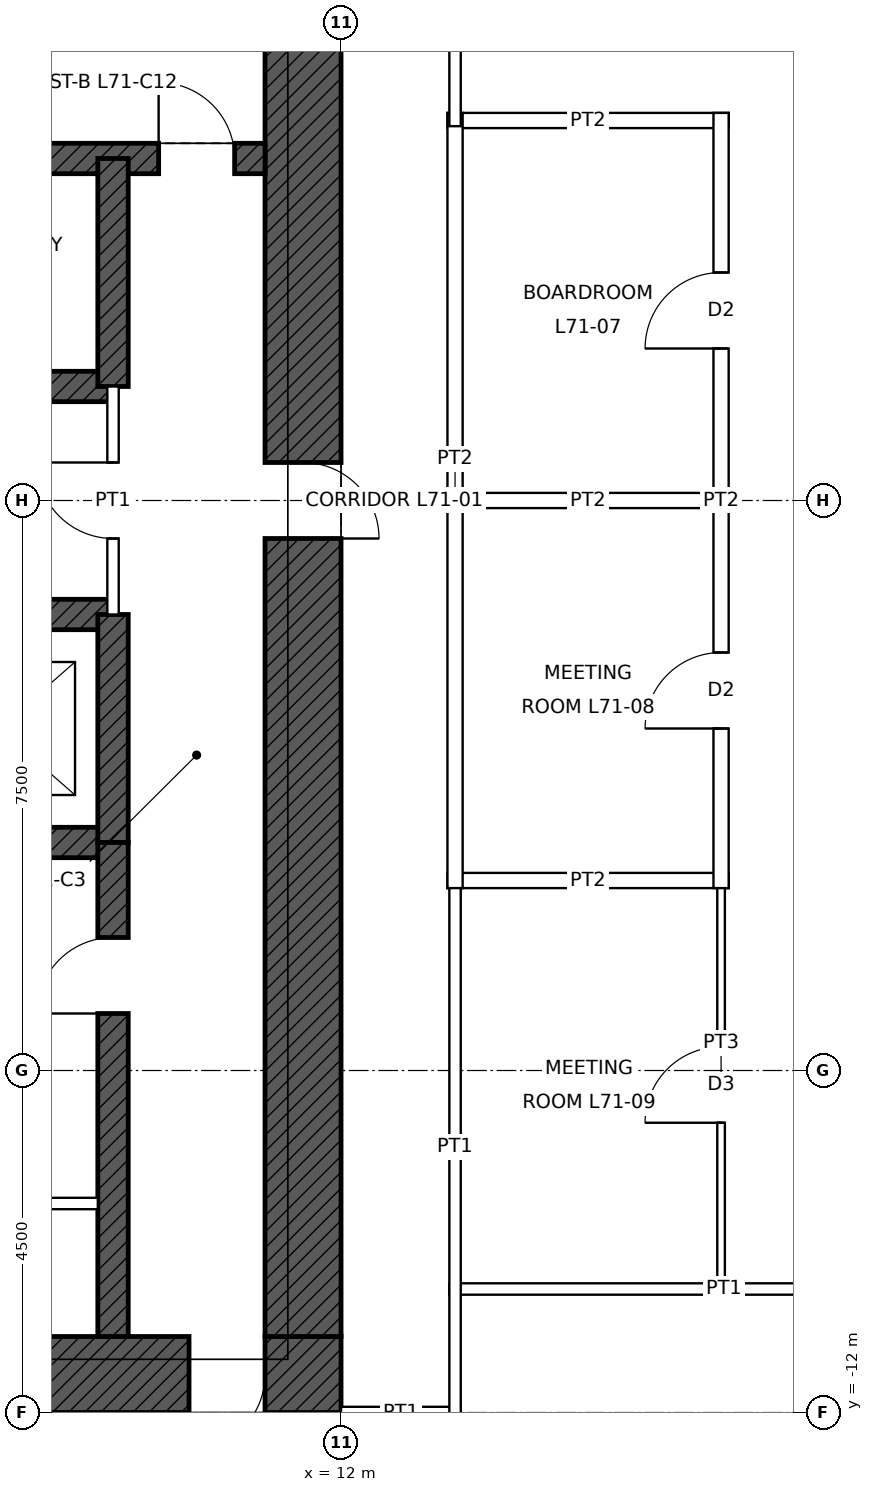
"""IFC4 building model, lengths in metres.
Left out: names, types, materials, properties, quantities, classifications, styles, units other than length and angle.
Written with IfcOpenShell. Run it as: python <this file> out.ifc"""

import sys

from ifc_helpers import new_model, si_unit, direction, frame, frame_2d, origin, place, context, subcontext, project, spatial, rectangle, extrude, element, fill, save


model = new_model("IFC4")
c1 = context("Model", 3, precision=1e-05, world=origin(), true_north=direction((0.0, 1.0)))
c2 = subcontext(c1, "Body", "Model", "MODEL_VIEW")
j1 = project(units=[si_unit("LENGTHUNIT", "METRE"), si_unit("PLANEANGLEUNIT", "RADIAN")], contexts=[c1])
p1 = place(None, origin())
s1 = spatial("IfcSite", under=j1, at=p1, CompositionType="ELEMENT")
p2 = place(p1, origin())
s2 = spatial("IfcBuilding", under=s1, at=p2, CompositionType="ELEMENT")
p3 = place(p2, frame((0.0, 0.0, 319.9)))
s3 = spatial("IfcBuildingStorey", under=s2, at=p3, CompositionType="ELEMENT", Elevation=319.9)
p4 = place(p3, frame((12.0, -11.5, 0.0), z_axis=(0.0, 0.0, 1.0), x_axis=(-1.0, 0.0, 0.0)))
e1 = element("IfcWall", 1, at=p4, inside=s3, PredefinedType="SHEAR", context=c2, shape_type="SweptSolid", body=[
    extrude(rectangle(XDim=24.0, YDim=1.0, at=frame_2d((12.0, 0.0))), origin(), (0.0, 0.0, 1.0), 4.0),
])
p5 = place(p4, frame((11.5, 0.0, 0.0)))
e2 = element("IfcOpeningElement", 2, at=p5, cuts=e1, PredefinedType="OPENING", context=c2, shape_type="SweptSolid", body=[
    extrude(rectangle(XDim=1.0, YDim=2.1, at=frame_2d((0.5, 1.05))), frame((0.0, 0.51, 0.0), z_axis=(0.0, -1.0, 0.0), x_axis=(1.0, 0.0, 0.0)), (0.0, 0.0, 1.0), 1.02),
])
p6 = place(p4, frame((1.0, 0.0, 0.0)))
e3 = element("IfcOpeningElement", 3, at=p6, cuts=e1, PredefinedType="OPENING", context=c2, shape_type="SweptSolid", body=[
    extrude(rectangle(XDim=1.0, YDim=2.4, at=frame_2d((0.5, 1.2))), frame((0.0, 0.51, 0.0), z_axis=(0.0, -1.0, 0.0), x_axis=(1.0, 0.0, 0.0)), (0.0, 0.0, 1.0), 1.02),
])
p7 = place(p3, frame((11.5, 11.0, 0.0), z_axis=(0.0, 0.0, 1.0), x_axis=(0.0, -1.0, 0.0)))
e4 = element("IfcWall", 4, at=p7, inside=s3, PredefinedType="SHEAR", context=c2, shape_type="SweptSolid", body=[
    extrude(rectangle(XDim=22.0, YDim=1.0, at=frame_2d((11.0, 0.0))), origin(), (0.0, 0.0, 1.0), 4.0),
])
p8 = place(p7, frame((10.5, 0.0, 0.0)))
e5 = element("IfcOpeningElement", 5, at=p8, cuts=e4, PredefinedType="OPENING", context=c2, shape_type="SweptSolid", body=[
    extrude(rectangle(XDim=1.0, YDim=2.4, at=frame_2d((0.5, 1.2))), frame((0.0, 0.51, 0.0), z_axis=(0.0, -1.0, 0.0), x_axis=(1.0, 0.0, 0.0)), (0.0, 0.0, 1.0), 1.02),
])
p9 = place(p3, frame((-11.0, 4.5, 0.0), z_axis=(0.0, 0.0, 1.0), x_axis=(1.0, 0.0, 0.0)))
e6 = element("IfcWall", 6, at=p9, inside=s3, PredefinedType="SHEAR", context=c2, shape_type="SweptSolid", body=[
    extrude(rectangle(XDim=22.0, YDim=0.4, at=frame_2d((11.0, 0.0))), origin(), (0.0, 0.0, 1.0), 4.0),
])
p10 = place(p9, frame((0.4, 0.0, 0.0)))
e7 = element("IfcOpeningElement", 7, at=p10, cuts=e6, PredefinedType="OPENING", context=c2, shape_type="SweptSolid", body=[
    extrude(rectangle(XDim=1.0, YDim=2.1, at=frame_2d((0.5, 1.05))), frame((0.0, 0.21, 0.0), z_axis=(0.0, -1.0, 0.0), x_axis=(1.0, 0.0, 0.0)), (0.0, 0.0, 1.0), 0.42),
])
p11 = place(p9, frame((20.6, 0.0, 0.0)))
e8 = element("IfcOpeningElement", 8, at=p11, cuts=e6, PredefinedType="OPENING", context=c2, shape_type="SweptSolid", body=[
    extrude(rectangle(XDim=1.0, YDim=2.1, at=frame_2d((0.5, 1.05))), frame((0.0, 0.21, 0.0), z_axis=(0.0, -1.0, 0.0), x_axis=(1.0, 0.0, 0.0)), (0.0, 0.0, 1.0), 0.42),
])
p12 = place(p3, frame((-9.0, 1.5, 0.0), z_axis=(0.0, 0.0, 1.0), x_axis=(1.0, 0.0, 0.0)))
e9 = element("IfcWall", 9, at=p12, inside=s3, PredefinedType="SHEAR", context=c2, shape_type="SweptSolid", body=[
    extrude(rectangle(XDim=18.0, YDim=0.4, at=frame_2d((9.0, 0.0))), origin(), (0.0, 0.0, 1.0), 4.0),
])
p13 = place(p12, frame((0.95, 0.0, 0.0)))
e10 = element("IfcOpeningElement", 10, at=p13, cuts=e9, PredefinedType="OPENING", context=c2, shape_type="SweptSolid", body=[
    extrude(rectangle(XDim=1.1, YDim=2.1, at=frame_2d((0.55, 1.05))), frame((0.0, 0.21, 0.0), z_axis=(0.0, -1.0, 0.0), x_axis=(1.0, 0.0, 0.0)), (0.0, 0.0, 1.0), 0.42),
])
p14 = place(p12, frame((3.95, 0.0, 0.0)))
e11 = element("IfcOpeningElement", 11, at=p14, cuts=e9, PredefinedType="OPENING", context=c2, shape_type="SweptSolid", body=[
    extrude(rectangle(XDim=1.1, YDim=2.1, at=frame_2d((0.55, 1.05))), frame((0.0, 0.21, 0.0), z_axis=(0.0, -1.0, 0.0), x_axis=(1.0, 0.0, 0.0)), (0.0, 0.0, 1.0), 0.42),
])
p15 = place(p12, frame((6.95, 0.0, 0.0)))
e12 = element("IfcOpeningElement", 12, at=p15, cuts=e9, PredefinedType="OPENING", context=c2, shape_type="SweptSolid", body=[
    extrude(rectangle(XDim=1.1, YDim=2.1, at=frame_2d((0.55, 1.05))), frame((0.0, 0.21, 0.0), z_axis=(0.0, -1.0, 0.0), x_axis=(1.0, 0.0, 0.0)), (0.0, 0.0, 1.0), 0.42),
])
p16 = place(p12, frame((9.95, 0.0, 0.0)))
e13 = element("IfcOpeningElement", 13, at=p16, cuts=e9, PredefinedType="OPENING", context=c2, shape_type="SweptSolid", body=[
    extrude(rectangle(XDim=1.1, YDim=2.1, at=frame_2d((0.55, 1.05))), frame((0.0, 0.21, 0.0), z_axis=(0.0, -1.0, 0.0), x_axis=(1.0, 0.0, 0.0)), (0.0, 0.0, 1.0), 0.42),
])
p17 = place(p12, frame((12.95, 0.0, 0.0)))
e14 = element("IfcOpeningElement", 14, at=p17, cuts=e9, PredefinedType="OPENING", context=c2, shape_type="SweptSolid", body=[
    extrude(rectangle(XDim=1.1, YDim=2.1, at=frame_2d((0.55, 1.05))), frame((0.0, 0.21, 0.0), z_axis=(0.0, -1.0, 0.0), x_axis=(1.0, 0.0, 0.0)), (0.0, 0.0, 1.0), 0.42),
])
p18 = place(p12, frame((15.95, 0.0, 0.0)))
e15 = element("IfcOpeningElement", 15, at=p18, cuts=e9, PredefinedType="OPENING", context=c2, shape_type="SweptSolid", body=[
    extrude(rectangle(XDim=1.1, YDim=2.1, at=frame_2d((0.55, 1.05))), frame((0.0, 0.21, 0.0), z_axis=(0.0, -1.0, 0.0), x_axis=(1.0, 0.0, 0.0)), (0.0, 0.0, 1.0), 0.42),
])
p19 = place(p3, frame((-9.0, -1.5, 0.0), z_axis=(0.0, 0.0, 1.0), x_axis=(1.0, 0.0, 0.0)))
e16 = element("IfcWall", 16, at=p19, inside=s3, PredefinedType="SHEAR", context=c2, shape_type="SweptSolid", body=[
    extrude(rectangle(XDim=18.0, YDim=0.4, at=frame_2d((9.0, 0.0))), origin(), (0.0, 0.0, 1.0), 4.0),
])
p20 = place(p19, frame((9.95, 0.0, 0.0)))
e17 = element("IfcOpeningElement", 17, at=p20, cuts=e16, PredefinedType="OPENING", context=c2, shape_type="SweptSolid", body=[
    extrude(rectangle(XDim=1.1, YDim=2.1, at=frame_2d((0.55, 1.05))), frame((0.0, 0.21, 0.0), z_axis=(0.0, -1.0, 0.0), x_axis=(1.0, 0.0, 0.0)), (0.0, 0.0, 1.0), 0.42),
])
p21 = place(p19, frame((12.95, 0.0, 0.0)))
e18 = element("IfcOpeningElement", 18, at=p21, cuts=e16, PredefinedType="OPENING", context=c2, shape_type="SweptSolid", body=[
    extrude(rectangle(XDim=1.1, YDim=2.1, at=frame_2d((0.55, 1.05))), frame((0.0, 0.21, 0.0), z_axis=(0.0, -1.0, 0.0), x_axis=(1.0, 0.0, 0.0)), (0.0, 0.0, 1.0), 0.42),
])
p22 = place(p19, frame((15.95, 0.0, 0.0)))
e19 = element("IfcOpeningElement", 19, at=p22, cuts=e16, PredefinedType="OPENING", context=c2, shape_type="SweptSolid", body=[
    extrude(rectangle(XDim=1.1, YDim=2.1, at=frame_2d((0.55, 1.05))), frame((0.0, 0.21, 0.0), z_axis=(0.0, -1.0, 0.0), x_axis=(1.0, 0.0, 0.0)), (0.0, 0.0, 1.0), 0.42),
])
p23 = place(p19, frame((0.95, 0.0, 0.0)))
e20 = element("IfcOpeningElement", 20, at=p23, cuts=e16, PredefinedType="OPENING", context=c2, shape_type="SweptSolid", body=[
    extrude(rectangle(XDim=1.1, YDim=2.1, at=frame_2d((0.55, 1.05))), frame((0.0, 0.21, 0.0), z_axis=(0.0, -1.0, 0.0), x_axis=(1.0, 0.0, 0.0)), (0.0, 0.0, 1.0), 0.42),
])
p24 = place(p19, frame((3.95, 0.0, 0.0)))
e21 = element("IfcOpeningElement", 21, at=p24, cuts=e16, PredefinedType="OPENING", context=c2, shape_type="SweptSolid", body=[
    extrude(rectangle(XDim=1.1, YDim=2.1, at=frame_2d((0.55, 1.05))), frame((0.0, 0.21, 0.0), z_axis=(0.0, -1.0, 0.0), x_axis=(1.0, 0.0, 0.0)), (0.0, 0.0, 1.0), 0.42),
])
p25 = place(p19, frame((6.95, 0.0, 0.0)))
e22 = element("IfcOpeningElement", 22, at=p25, cuts=e16, PredefinedType="OPENING", context=c2, shape_type="SweptSolid", body=[
    extrude(rectangle(XDim=1.1, YDim=2.1, at=frame_2d((0.55, 1.05))), frame((0.0, 0.21, 0.0), z_axis=(0.0, -1.0, 0.0), x_axis=(1.0, 0.0, 0.0)), (0.0, 0.0, 1.0), 0.42),
])
p26 = place(p3, frame((-9.0, -4.5, 0.0), z_axis=(0.0, 0.0, 1.0), x_axis=(1.0, 0.0, 0.0)))
e23 = element("IfcWall", 23, at=p26, inside=s3, PredefinedType="SHEAR", context=c2, shape_type="SweptSolid", body=[
    extrude(rectangle(XDim=18.0, YDim=0.4, at=frame_2d((9.0, 0.0))), origin(), (0.0, 0.0, 1.0), 4.0),
])
for number, where, z_axis, x_axis in (
    (24, (9.0, 1.5, 0.0), (0.0, 0.0, 1.0), (0.0, 1.0, 0.0)),
    (25, (9.0, -4.5, 0.0), (0.0, 0.0, 1.0), (0.0, 1.0, 0.0)),
):
    element("IfcWall", number, at=place(p3, frame(where, z_axis=z_axis, x_axis=x_axis)), inside=s3, PredefinedType="SHEAR", context=c2, shape_type="SweptSolid", body=[
        extrude(rectangle(XDim=3.0, YDim=0.4, at=frame_2d((1.5, 0.0))), origin(), (0.0, 0.0, 1.0), 4.0),
    ])
p27 = place(p3, frame((9.0, -11.0, 0.0), z_axis=(0.0, 0.0, 1.0), x_axis=(0.0, 1.0, 0.0)))
e26 = element("IfcWall", 26, at=p27, inside=s3, PredefinedType="SHEAR", context=c2, shape_type="SweptSolid", body=[
    extrude(rectangle(XDim=6.5, YDim=0.4, at=frame_2d((3.25, 0.0))), origin(), (0.0, 0.0, 1.0), 4.0),
])
p28 = place(p27, frame((4.25, 0.0, 0.0)))
e27 = element("IfcOpeningElement", 27, at=p28, cuts=e26, PredefinedType="OPENING", context=c2, shape_type="SweptSolid", body=[
    extrude(rectangle(XDim=1.0, YDim=2.1, at=frame_2d((0.5, 1.05))), frame((0.0, 0.21, 0.0), z_axis=(0.0, -1.0, 0.0), x_axis=(1.0, 0.0, 0.0)), (0.0, 0.0, 1.0), 0.42),
])
p29 = place(p3, frame((12.0, -12.0, 0.0), z_axis=(0.0, 0.0, 1.0), x_axis=(1.0, 0.0, 0.0)))
e28 = element("IfcWall", 28, at=p29, inside=s3, PredefinedType="PARTITIONING", context=c2, shape_type="SweptSolid", body=[
    extrude(rectangle(XDim=1.575, YDim=0.15, at=frame_2d((0.788, 0.0))), origin(), (0.0, 0.0, 1.0), 3.85),
])
p30 = place(p3, frame((13.425, -10.375, 0.0), z_axis=(0.0, 0.0, 1.0), x_axis=(1.0, 0.0, 0.0)))
e29 = element("IfcWall", 29, at=p30, inside=s3, PredefinedType="PARTITIONING", context=c2, shape_type="SweptSolid", body=[
    extrude(rectangle(XDim=7.225, YDim=0.15, at=frame_2d((3.612, 0.0))), origin(), (0.0, 0.0, 1.0), 3.85),
])
p31 = place(p3, frame((13.4, -5.0, 0.0), z_axis=(0.0, 0.0, 1.0), x_axis=(1.0, 0.0, 0.0)))
e30 = element("IfcWall", 30, at=p31, inside=s3, PredefinedType="PARTITIONING", context=c2, shape_type="SweptSolid", body=[
    extrude(rectangle(XDim=3.7, YDim=0.2, at=frame_2d((1.85, 0.0))), origin(), (0.0, 0.0, 1.0), 3.85),
])
p32 = place(p3, frame((13.4, 0.0, 0.0), z_axis=(0.0, 0.0, 1.0), x_axis=(1.0, 0.0, 0.0)))
e31 = element("IfcWall", 31, at=p32, inside=s3, PredefinedType="PARTITIONING", context=c2, shape_type="SweptSolid", body=[
    extrude(rectangle(XDim=3.7, YDim=0.2, at=frame_2d((1.85, 0.0))), origin(), (0.0, 0.0, 1.0), 3.243),
])
p33 = place(p3, frame((13.4, 5.0, 0.0), z_axis=(0.0, 0.0, 1.0), x_axis=(1.0, 0.0, 0.0)))
e32 = element("IfcWall", 32, at=p33, inside=s3, PredefinedType="PARTITIONING", context=c2, shape_type="SweptSolid", body=[
    extrude(rectangle(XDim=3.7, YDim=0.2, at=frame_2d((1.85, 0.0))), origin(), (0.0, 0.0, 1.0), 3.85),
])
p34 = place(p3, frame((13.5, -12.075, 0.0), z_axis=(0.0, 0.0, 1.0), x_axis=(0.0, 1.0, 0.0)))
e33 = element("IfcWall", 33, at=p34, inside=s3, PredefinedType="PARTITIONING", context=c2, shape_type="SweptSolid", body=[
    extrude(rectangle(XDim=7.15, YDim=0.15, at=frame_2d((3.575, 0.0))), origin(), (0.0, 0.0, 1.0), 3.85),
])
p35 = place(p3, frame((13.5, -5.1, 0.0), z_axis=(0.0, 0.0, 1.0), x_axis=(0.0, 1.0, 0.0)))
e34 = element("IfcWall", 34, at=p35, inside=s3, PredefinedType="PARTITIONING", context=c2, shape_type="SweptSolid", body=[
    extrude(rectangle(XDim=10.2, YDim=0.2, at=frame_2d((5.1, 0.0))), origin(), (0.0, 0.0, 1.0), 3.85),
])
p36 = place(p3, frame((13.5, 4.925, 0.0), z_axis=(0.0, 0.0, 1.0), x_axis=(0.0, 1.0, 0.0)))
e35 = element("IfcWall", 35, at=p36, inside=s3, PredefinedType="PARTITIONING", context=c2, shape_type="SweptSolid", body=[
    extrude(rectangle(XDim=8.65, YDim=0.15, at=frame_2d((4.325, 0.0))), origin(), (0.0, 0.0, 1.0), 3.85),
])
p37 = place(p36, frame((3.825, 0.0, 0.0)))
e36 = element("IfcOpeningElement", 36, at=p37, cuts=e35, PredefinedType="OPENING", context=c2, shape_type="SweptSolid", body=[
    extrude(rectangle(XDim=1.0, YDim=2.4, at=frame_2d((0.5, 1.2))), frame((0.0, 0.085, 0.0), z_axis=(0.0, -1.0, 0.0), x_axis=(1.0, 0.0, 0.0)), (0.0, 0.0, 1.0), 0.17),
])
p38 = place(p3, frame((17.0, -10.425, 0.0), z_axis=(0.0, 0.0, 1.0), x_axis=(0.0, 1.0, 0.0)))
e37 = element("IfcWall", 37, at=p38, inside=s3, PredefinedType="PARTITIONING", context=c2, shape_type="SweptSolid", body=[
    extrude(rectangle(XDim=5.475, YDim=0.1, at=frame_2d((2.738, 0.0))), origin(), (0.0, 0.0, 1.0), 3.85),
])
p39 = place(p38, frame((2.238, 0.0, 0.0)))
e38 = element("IfcOpeningElement", 38, at=p39, cuts=e37, PredefinedType="OPENING", context=c2, shape_type="SweptSolid", body=[
    extrude(rectangle(XDim=1.0, YDim=2.1, at=frame_2d((0.5, 1.05))), frame((0.0, 0.06, 0.0), z_axis=(0.0, -1.0, 0.0), x_axis=(1.0, 0.0, 0.0)), (0.0, 0.0, 1.0), 0.12),
])
p40 = place(p3, frame((17.0, -5.1, 0.0), z_axis=(0.0, 0.0, 1.0), x_axis=(0.0, 1.0, 0.0)))
e39 = element("IfcWall", 39, at=p40, inside=s3, PredefinedType="PARTITIONING", context=c2, shape_type="SweptSolid", body=[
    extrude(rectangle(XDim=10.2, YDim=0.2, at=frame_2d((5.1, 0.0))), origin(), (0.0, 0.0, 1.0), 3.85),
])
p41 = place(p40, frame((7.1, 0.0, 0.0)))
e40 = element("IfcOpeningElement", 40, at=p41, cuts=e39, PredefinedType="OPENING", context=c2, shape_type="SweptSolid", body=[
    extrude(rectangle(XDim=1.0, YDim=2.1, at=frame_2d((0.5, 1.05))), frame((0.0, 0.11, 0.0), z_axis=(0.0, -1.0, 0.0), x_axis=(1.0, 0.0, 0.0)), (0.0, 0.0, 1.0), 0.22),
])
p42 = place(p40, frame((2.1, 0.0, 0.0)))
e41 = element("IfcOpeningElement", 41, at=p42, cuts=e39, PredefinedType="OPENING", context=c2, shape_type="SweptSolid", body=[
    extrude(rectangle(XDim=1.0, YDim=2.1, at=frame_2d((0.5, 1.05))), frame((0.0, 0.11, 0.0), z_axis=(0.0, -1.0, 0.0), x_axis=(1.0, 0.0, 0.0)), (0.0, 0.0, 1.0), 0.22),
])
p43 = place(p3, frame((3.2, -9.25, 0.0), z_axis=(0.0, 0.0, 1.0), x_axis=(1.0, 0.0, 0.0)))
e42 = element("IfcWall", 42, at=p43, inside=s3, PredefinedType="PARTITIONING", context=c2, shape_type="SweptSolid", body=[
    extrude(rectangle(XDim=5.6, YDim=0.15, at=frame_2d((2.8, 0.0))), origin(), (0.0, 0.0, 1.0), 3.75),
])
p44 = place(p43, frame((2.3, 0.0, 0.0)))
e43 = element("IfcOpeningElement", 43, at=p44, cuts=e42, PredefinedType="OPENING", context=c2, shape_type="SweptSolid", body=[
    extrude(rectangle(XDim=1.0, YDim=2.1, at=frame_2d((0.5, 1.05))), frame((0.0, 0.085, 0.0), z_axis=(0.0, -1.0, 0.0), x_axis=(1.0, 0.0, 0.0)), (0.0, 0.0, 1.0), 0.17),
])
p45 = place(p3, frame((9.0, -1.5, 0.0), z_axis=(0.0, 0.0, 1.0), x_axis=(0.0, 1.0, 0.0)))
e44 = element("IfcWall", 44, at=p45, inside=s3, PredefinedType="PARTITIONING", context=c2, shape_type="SweptSolid", body=[
    extrude(rectangle(XDim=3.0, YDim=0.15, at=frame_2d((1.5, 0.0))), origin(), (0.0, 0.0, 1.0), 3.75),
])
p46 = place(p45, frame((1.0, 0.0, 0.0)))
e45 = element("IfcOpeningElement", 45, at=p46, cuts=e44, PredefinedType="OPENING", context=c2, shape_type="SweptSolid", body=[
    extrude(rectangle(XDim=1.0, YDim=2.4, at=frame_2d((0.5, 1.2))), frame((0.0, 0.085, 0.0), z_axis=(0.0, -1.0, 0.0), x_axis=(1.0, 0.0, 0.0)), (0.0, 0.0, 1.0), 0.17),
])
p47 = place(p11, origin())
e46 = element("IfcDoor", 46, at=p47, inside=s3, OperationType="SINGLE_SWING_LEFT", PredefinedType="DOOR", context=c2, shape_type="SweptSolid", body=[
    extrude(rectangle(XDim=1.0, YDim=2.1, at=frame_2d((0.5, 1.05))), frame((0.0, 0.025, 0.0), z_axis=(0.0, -1.0, 0.0), x_axis=(1.0, 0.0, 0.0)), (0.0, 0.0, 1.0), 0.05),
])
fill(e8, e46)
p48 = place(p8, origin())
e47 = element("IfcDoor", 47, at=p48, inside=s3, OperationType="SINGLE_SWING_RIGHT", PredefinedType="DOOR", context=c2, shape_type="SweptSolid", body=[
    extrude(rectangle(XDim=1.0, YDim=2.4, at=frame_2d((0.5, 1.2))), frame((0.0, 0.485, 0.0), z_axis=(0.0, -1.0, 0.0), x_axis=(1.0, 0.0, 0.0)), (0.0, 0.0, 1.0), 0.05),
])
fill(e5, e47)
p49 = place(p6, origin())
e48 = element("IfcDoor", 48, at=p49, inside=s3, OperationType="SINGLE_SWING_RIGHT", PredefinedType="DOOR", context=c2, shape_type="SweptSolid", body=[
    extrude(rectangle(XDim=1.0, YDim=2.4, at=frame_2d((0.5, 1.2))), frame((0.0, 0.485, 0.0), z_axis=(0.0, -1.0, 0.0), x_axis=(1.0, 0.0, 0.0)), (0.0, 0.0, 1.0), 0.05),
])
fill(e3, e48)
p50 = place(p28, origin())
e49 = element("IfcDoor", 49, at=p50, inside=s3, OperationType="SINGLE_SWING_LEFT", PredefinedType="DOOR", context=c2, shape_type="SweptSolid", body=[
    extrude(rectangle(XDim=1.0, YDim=2.1, at=frame_2d((0.5, 1.05))), frame((0.0, 0.025, 0.0), z_axis=(0.0, -1.0, 0.0), x_axis=(1.0, 0.0, 0.0)), (0.0, 0.0, 1.0), 0.05),
])
fill(e27, e49)
p51 = place(p46, origin())
e50 = element("IfcDoor", 50, at=p51, inside=s3, OperationType="SINGLE_SWING_RIGHT", PredefinedType="DOOR", context=c2, shape_type="SweptSolid", body=[
    extrude(rectangle(XDim=1.0, YDim=2.4, at=frame_2d((0.5, 1.2))), frame((0.0, 0.025, 0.0), z_axis=(0.0, -1.0, 0.0), x_axis=(1.0, 0.0, 0.0)), (0.0, 0.0, 1.0), 0.05),
])
fill(e45, e50)
p52 = place(p41, origin())
e51 = element("IfcDoor", 51, at=p52, inside=s3, OperationType="SINGLE_SWING_LEFT", PredefinedType="DOOR", context=c2, shape_type="SweptSolid", body=[
    extrude(rectangle(XDim=1.0, YDim=2.1, at=frame_2d((0.5, 1.05))), frame((0.0, 0.025, 0.0), z_axis=(0.0, -1.0, 0.0), x_axis=(1.0, 0.0, 0.0)), (0.0, 0.0, 1.0), 0.05),
])
fill(e40, e51)
p53 = place(p42, origin())
e52 = element("IfcDoor", 52, at=p53, inside=s3, OperationType="SINGLE_SWING_LEFT", PredefinedType="DOOR", context=c2, shape_type="SweptSolid", body=[
    extrude(rectangle(XDim=1.0, YDim=2.1, at=frame_2d((0.5, 1.05))), frame((0.0, 0.025, 0.0), z_axis=(0.0, -1.0, 0.0), x_axis=(1.0, 0.0, 0.0)), (0.0, 0.0, 1.0), 0.05),
])
fill(e41, e52)
p54 = place(p39, origin())
e53 = element("IfcDoor", 53, at=p54, inside=s3, OperationType="SINGLE_SWING_LEFT", PredefinedType="DOOR", context=c2, shape_type="SweptSolid", body=[
    extrude(rectangle(XDim=1.0, YDim=2.1, at=frame_2d((0.5, 1.05))), frame((0.0, 0.025, 0.0), z_axis=(0.0, -1.0, 0.0), x_axis=(1.0, 0.0, 0.0)), (0.0, 0.0, 1.0), 0.05),
])
fill(e38, e53)
save(model, sys.argv[1])
